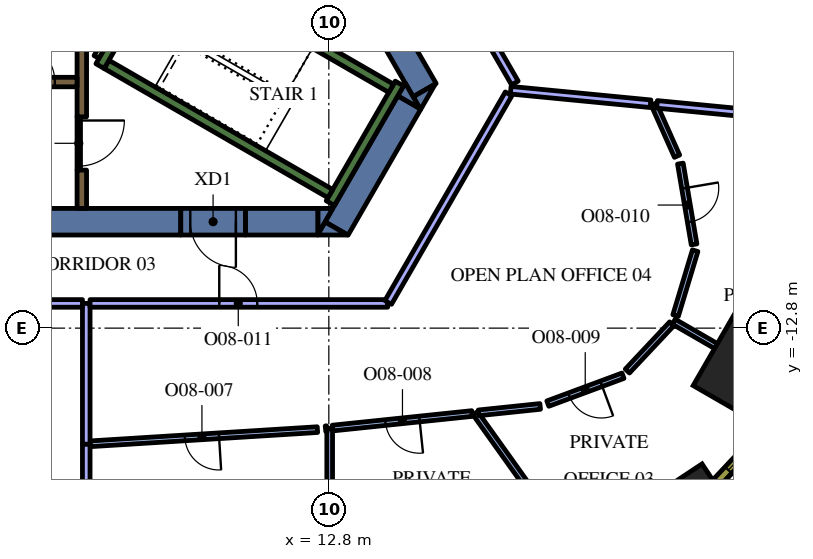
"""IFC4 building model, lengths in metres.
Left out: names, types, materials, properties, quantities, classifications, styles, units other than length and angle.
Written with IfcOpenShell. Run it as: python <this file> out.ifc"""

import sys

from ifc_helpers import new_model, si_unit, direction, frame, frame_2d, origin, origin_2d, place, context, subcontext, project, spatial, polyline, rectangle, outline, extrude, element, fill, save


model = new_model("IFC4")
c1 = context("Model", 3, precision=1e-05, world=origin(), true_north=direction((0.0, 1.0)))
c2 = subcontext(c1, "Body", "Model", "MODEL_VIEW")
j1 = project(units=[si_unit("LENGTHUNIT", "METRE"), si_unit("PLANEANGLEUNIT", "RADIAN")], contexts=[c1])
p1 = place(None, origin())
s1 = spatial("IfcSite", under=j1, at=p1, CompositionType="ELEMENT")
p2 = place(p1, origin())
s2 = spatial("IfcBuilding", under=s1, at=p2, CompositionType="ELEMENT")
p3 = place(p2, frame((0.0, 0.0, 231.0)))
s3 = spatial("IfcBuildingStorey", under=s2, at=p3, CompositionType="ELEMENT", Elevation=231.0)
p4 = place(p3, frame((24.027, -13.872, 0.0), z_axis=(0.0, 0.0, 1.0), x_axis=(0.866025403784, -0.5, 0.0)))
e1 = element("IfcColumn", 1, at=p4, inside=s3, PredefinedType="COLUMN", context=c2, shape_type="SweptSolid", body=[
    extrude(rectangle(XDim=2.4, YDim=2.4, at=origin_2d()), origin(), (0.0, 0.0, 1.0), 4.2),
])
p5 = place(p3, frame((22.494, -16.997, 0.0), z_axis=(0.0, 0.0, 1.0), x_axis=(0.833238868178, 0.552913183563, 0.0)))
e2 = element("IfcColumn", 2, at=p5, inside=s3, PredefinedType="COLUMN", context=c2, shape_type="SweptSolid", body=[
    extrude(rectangle(XDim=0.9, YDim=0.9, at=origin_2d()), origin(), (0.0, 0.0, 1.0), 4.2),
])
p6 = place(p3, frame((9.085, 4.264, 0.0), z_axis=(0.0, 0.0, 1.0), x_axis=(0.499998082512, -0.866026510844, 0.0)))
e3 = element("IfcWall", 3, at=p6, inside=s3, PredefinedType="SOLIDWALL", context=c2, shape_type="SweptSolid", body=[
    extrude(rectangle(XDim=12.472, YDim=0.7, at=frame_2d((6.236, 0.0))), origin(), (0.0, 0.0, 1.0), 4.2),
])
p7 = place(p3, origin())
e4 = element("IfcWall", 4, at=p7, inside=s3, PredefinedType="SOLIDWALL", context=c2, shape_type="SweptSolid", body=[
    extrude(outline(polyline([(15.213, -7.05), (15.019, -6.714), (15.601, -6.378), (15.213, -7.05)])), origin(), (0.0, 0.0, 1.0), 4.2),
])
p8 = place(p3, frame((13.003, -10.179, 0.0), z_axis=(0.0, 0.0, 1.0), x_axis=(0.499972675833, 0.866041178825, 0.0)))
e5 = element("IfcWall", 5, at=p8, inside=s3, PredefinedType="SOLIDWALL", context=c2, shape_type="SweptSolid", body=[
    extrude(rectangle(XDim=3.829, YDim=0.7, at=frame_2d((1.915, 0.0))), origin(), (0.0, 0.0, 1.0), 4.2),
])
e6 = element("IfcWall", 6, at=p7, inside=s3, PredefinedType="SOLIDWALL", context=c2, shape_type="SweptSolid", body=[
    extrude(outline(polyline([(12.5, -10.35), (12.698, -10.005), (13.296, -10.35), (12.5, -10.35)])), origin(), (0.0, 0.0, 1.0), 4.2),
])
e7 = element("IfcWall", 7, at=p7, inside=s3, PredefinedType="SOLIDWALL", context=c2, shape_type="SweptSolid", body=[
    extrude(outline(polyline([(14.809, -6.35), (15.197, -7.022), (14.615, -6.686), (14.809, -6.35)])), origin(), (0.0, 0.0, 1.0), 4.2),
])
p9 = place(p3, frame((10.604, -10.0, 0.0), z_axis=(0.0, 0.0, 1.0), x_axis=(1.0, 0.0, 0.0)))
e8 = element("IfcWall", 8, at=p9, inside=s3, PredefinedType="SOLIDWALL", context=c2, shape_type="SweptSolid", body=[
    extrude(rectangle(XDim=1.909, YDim=0.7, at=frame_2d((0.955, 0.0))), origin(), (0.0, 0.0, 1.0), 4.2),
])
e9 = element("IfcWall", 9, at=p7, inside=s3, PredefinedType="SOLIDWALL", context=c2, shape_type="SweptSolid", body=[
    extrude(outline(polyline([(12.904, -9.65), (12.516, -10.322), (12.516, -9.65), (12.904, -9.65)])), origin(), (0.0, 0.0, 1.0), 4.2),
])
p10 = place(p3, frame((8.904, -10.0, 0.0), z_axis=(0.0, 0.0, 1.0), x_axis=(-1.0, 0.0, 0.0)))
e10 = element("IfcWall", 10, at=p10, inside=s3, PredefinedType="SOLIDWALL", context=c2, shape_type="SweptSolid", body=[
    extrude(rectangle(XDim=22.226, YDim=0.7, at=frame_2d((11.113, 0.0))), origin(), (0.0, 0.0, 1.0), 4.2),
])
p11 = place(p3, frame((12.84, -9.511, 0.0), z_axis=(0.0, 0.0, 1.0), x_axis=(0.500048121057, 0.865997619297, 0.0)))
e11 = element("IfcWall", 11, at=p11, inside=s3, PredefinedType="SOLIDWALL", context=c2, shape_type="SweptSolid", body=[
    extrude(rectangle(XDim=3.634, YDim=0.25, at=frame_2d((1.817, 0.0))), origin(), (0.0, 0.0, 1.0), 4.2),
])
p12 = place(p3, frame((12.84, -9.261, 0.0), z_axis=(0.0, 0.0, 1.0), x_axis=(-0.866013990052, 0.500019768644, 0.0)))
e12 = element("IfcWall", 12, at=p12, inside=s3, PredefinedType="SOLIDWALL", context=c2, shape_type="SweptSolid", body=[
    extrude(rectangle(XDim=6.8, YDim=0.25, at=frame_2d((3.4, 0.0))), origin(), (0.0, 0.0, 1.0), 4.2),
])
p13 = place(p3, frame((6.78, -5.906, 0.0), z_axis=(0.0, 0.0, 1.0), x_axis=(0.500223362819, 0.865896406789, 0.0)))
e13 = element("IfcWall", 13, at=p13, inside=s3, PredefinedType="SOLIDWALL", context=c2, shape_type="SweptSolid", body=[
    extrude(rectangle(XDim=0.675, YDim=0.25, at=frame_2d((0.337, 0.0))), origin(), (0.0, 0.0, 1.0), 4.2),
])
p14 = place(p3, frame((8.334, -2.964, 0.0), z_axis=(0.0, 0.0, 1.0), x_axis=(0.866016039709, -0.500016218704, 0.0)))
e14 = element("IfcWall", 14, at=p14, inside=s3, PredefinedType="SOLIDWALL", context=c2, shape_type="SweptSolid", body=[
    extrude(rectangle(XDim=7.05, YDim=0.25, at=frame_2d((3.525, 0.0))), origin(), (0.0, 0.0, 1.0), 4.2),
])
p15 = place(p3, frame((6.3, -7.24, 0.0), z_axis=(0.0, 0.0, 1.0), x_axis=(0.0, 1.0, 0.0)))
e15 = element("IfcWall", 15, at=p15, inside=s3, PredefinedType="SOLIDWALL", context=c2, shape_type="SweptSolid", body=[
    extrude(rectangle(XDim=3.24, YDim=0.25, at=frame_2d((1.62, 0.0))), origin(), (0.0, 0.0, 1.0), 4.2),
])
p16 = place(p3, frame((6.3, -9.65, 0.0), z_axis=(0.0, 0.0, 1.0), x_axis=(0.0, 1.0, 0.0)))
e16 = element("IfcWall", 16, at=p16, inside=s3, PredefinedType="SOLIDWALL", context=c2, shape_type="SweptSolid", body=[
    extrude(rectangle(XDim=1.008, YDim=0.25, at=frame_2d((0.504, 0.0))), origin(), (0.0, 0.0, 1.0), 4.2),
])
p17 = place(p3, frame((6.945, -5.222, 0.0), z_axis=(0.0, 0.0, 1.0), x_axis=(-0.499818422106, -0.866130212453, 0.0)))
e17 = element("IfcWall", 17, at=p17, inside=s3, PredefinedType="PARTITIONING", context=c2, shape_type="SweptSolid", body=[
    extrude(rectangle(XDim=0.514, YDim=0.15, at=frame_2d((0.257, 0.0))), origin(), (0.0, 0.0, 1.0), 3.45),
])
p18 = place(p3, frame((-6.175, -6.325, 0.0), z_axis=(0.0, 0.0, 1.0), x_axis=(1.0, 0.0, 0.0)))
e18 = element("IfcWall", 18, at=p18, inside=s3, PredefinedType="SOLIDWALL", context=c2, shape_type="SweptSolid", body=[
    extrude(rectangle(XDim=12.35, YDim=0.25, at=frame_2d((6.175, 0.0))), origin(), (0.0, 0.0, 1.0), 4.2),
])
p19 = place(p18, frame((0.585, 0.0, 0.0)))
e19 = element("IfcOpeningElement", 19, at=p19, cuts=e18, PredefinedType="OPENING", context=c2, shape_type="SweptSolid", body=[
    extrude(rectangle(XDim=1.1, YDim=2.1, at=frame_2d((0.55, 1.05))), frame((0.0, 0.135, 0.0), z_axis=(0.0, -1.0, 0.0), x_axis=(1.0, 0.0, 0.0)), (0.0, 0.0, 1.0), 0.27),
])
p20 = place(p18, frame((3.105, 0.0, 0.0)))
e20 = element("IfcOpeningElement", 20, at=p20, cuts=e18, PredefinedType="OPENING", context=c2, shape_type="SweptSolid", body=[
    extrude(rectangle(XDim=1.1, YDim=2.1, at=frame_2d((0.55, 1.05))), frame((0.0, 0.135, 0.0), z_axis=(0.0, -1.0, 0.0), x_axis=(1.0, 0.0, 0.0)), (0.0, 0.0, 1.0), 0.27),
])
p21 = place(p18, frame((5.625, 0.0, 0.0)))
e21 = element("IfcOpeningElement", 21, at=p21, cuts=e18, PredefinedType="OPENING", context=c2, shape_type="SweptSolid", body=[
    extrude(rectangle(XDim=1.1, YDim=2.1, at=frame_2d((0.55, 1.05))), frame((0.0, 0.135, 0.0), z_axis=(0.0, -1.0, 0.0), x_axis=(1.0, 0.0, 0.0)), (0.0, 0.0, 1.0), 0.27),
])
p22 = place(p18, frame((8.145, 0.0, 0.0)))
e22 = element("IfcOpeningElement", 22, at=p22, cuts=e18, PredefinedType="OPENING", context=c2, shape_type="SweptSolid", body=[
    extrude(rectangle(XDim=1.1, YDim=2.1, at=frame_2d((0.55, 1.05))), frame((0.0, 0.135, 0.0), z_axis=(0.0, -1.0, 0.0), x_axis=(1.0, 0.0, 0.0)), (0.0, 0.0, 1.0), 0.27),
])
p23 = place(p18, frame((10.665, 0.0, 0.0)))
e23 = element("IfcOpeningElement", 23, at=p23, cuts=e18, PredefinedType="OPENING", context=c2, shape_type="SweptSolid", body=[
    extrude(rectangle(XDim=1.1, YDim=2.1, at=frame_2d((0.55, 1.05))), frame((0.0, 0.135, 0.0), z_axis=(0.0, -1.0, 0.0), x_axis=(1.0, 0.0, 0.0)), (0.0, 0.0, 1.0), 0.27),
])
p24 = place(p3, frame((6.22, -7.237, 0.0), z_axis=(0.0, 0.0, 1.0), x_axis=(0.0, -1.0, 0.0)))
e24 = element("IfcWall", 24, at=p24, inside=s3, PredefinedType="PARTITIONING", context=c2, shape_type="SweptSolid", body=[
    extrude(rectangle(XDim=1.4, YDim=0.09, at=frame_2d((0.7, 0.0))), origin(), (0.0, 0.0, 1.0), 3.45),
])
p25 = place(p24, frame((0.1, 0.0, 0.0)))
e25 = element("IfcOpeningElement", 25, at=p25, cuts=e24, PredefinedType="OPENING", context=c2, shape_type="SweptSolid", body=[
    extrude(rectangle(XDim=1.2, YDim=2.1, at=frame_2d((0.6, 1.05))), frame((0.0, 0.055, 0.0), z_axis=(0.0, -1.0, 0.0), x_axis=(1.0, 0.0, 0.0)), (0.0, 0.0, 1.0), 0.11),
])
p26 = place(p3, frame((10.604, -10.0, 0.0), z_axis=(0.0, 0.0, 1.0), x_axis=(-1.0, 0.0, 0.0)))
e26 = element("IfcWall", 26, at=p26, inside=s3, PredefinedType="SOLIDWALL", context=c2, shape_type="SweptSolid", body=[
    extrude(rectangle(XDim=1.7, YDim=0.7, at=frame_2d((0.85, 0.0))), origin(), (0.0, 0.0, 1.0), 4.2),
])
p27 = place(p26, frame((0.25, 0.0, 0.0)))
e27 = element("IfcOpeningElement", 27, at=p27, cuts=e26, PredefinedType="OPENING", context=c2, shape_type="SweptSolid", body=[
    extrude(rectangle(XDim=1.2, YDim=2.1, at=frame_2d((0.6, 1.05))), frame((0.0, 0.36, 0.0), z_axis=(0.0, -1.0, 0.0), x_axis=(1.0, 0.0, 0.0)), (0.0, 0.0, 1.0), 0.72),
])
p28 = place(p3, frame((6.417, -15.846, 0.0), z_axis=(0.0, 0.0, 1.0), x_axis=(0.0, -1.0, 0.0)))
e28 = element("IfcWall", 28, at=p28, inside=s3, PredefinedType="PARTITIONING", context=c2, shape_type="SweptSolid", body=[
    extrude(rectangle(XDim=3.051, YDim=0.2, at=frame_2d((1.525, 0.0))), origin(), (0.0, 0.0, 1.0), 3.45),
])
p29 = place(p3, frame((6.417, -12.15, 0.0), z_axis=(0.0, 0.0, 1.0), x_axis=(0.0, -1.0, 0.0)))
e29 = element("IfcWall", 29, at=p29, inside=s3, PredefinedType="PARTITIONING", context=c2, shape_type="SweptSolid", body=[
    extrude(rectangle(XDim=3.704, YDim=0.2, at=frame_2d((1.852, 0.0))), origin(), (0.0, 0.0, 1.0), 3.45),
])
p30 = place(p3, frame((4.53, -12.15, 0.0), z_axis=(0.0, 0.0, 1.0), x_axis=(1.0, 0.0, 0.0)))
e30 = element("IfcWall", 30, at=p30, inside=s3, PredefinedType="PARTITIONING", context=c2, shape_type="SweptSolid", body=[
    extrude(rectangle(XDim=1.787, YDim=0.2, at=frame_2d((0.894, 0.0))), origin(), (0.0, 0.0, 1.0), 3.45),
])
p31 = place(p3, frame((12.823, -15.437, 0.0), z_axis=(0.0, 0.0, 1.0), x_axis=(0.0, -1.0, 0.0)))
e31 = element("IfcWall", 31, at=p31, inside=s3, PredefinedType="PARTITIONING", context=c2, shape_type="SweptSolid", body=[
    extrude(rectangle(XDim=3.058, YDim=0.15, at=frame_2d((1.529, 0.0))), origin(), (0.0, 0.0, 1.0), 3.45),
])
p32 = place(p3, frame((12.5, -15.471, 0.0), z_axis=(0.0, 0.0, 1.0), x_axis=(-0.998061916726, -0.0622286942, 0.0)))
e32 = element("IfcWall", 32, at=p32, inside=s3, PredefinedType="PARTITIONING", context=c2, shape_type="SweptSolid", body=[
    extrude(rectangle(XDim=5.995, YDim=0.15, at=frame_2d((2.998, 0.0))), origin(), (0.0, 0.0, 1.0), 3.45),
])
p33 = place(p32, frame((2.595, 0.0, 0.0)))
e33 = element("IfcOpeningElement", 33, at=p33, cuts=e32, PredefinedType="OPENING", context=c2, shape_type="SweptSolid", body=[
    extrude(rectangle(XDim=0.9, YDim=2.1, at=frame_2d((0.45, 1.05))), frame((0.0, 0.085, 0.0), z_axis=(0.0, -1.0, 0.0), x_axis=(1.0, 0.0, 0.0)), (0.0, 0.0, 1.0), 0.17),
])
p34 = place(p3, frame((12.713, -15.448, 0.0), z_axis=(0.0, 0.0, 1.0), x_axis=(0.995106821048, 0.098804932586, 0.0)))
e34 = element("IfcWall", 34, at=p34, inside=s3, PredefinedType="PARTITIONING", context=c2, shape_type="SweptSolid", body=[
    extrude(rectangle(XDim=0.035, YDim=0.15, at=frame_2d((0.017, 0.0))), origin(), (0.0, 0.0, 1.0), 3.45),
])
p35 = place(p3, frame((16.655, -15.038, 0.0), z_axis=(0.0, 0.0, 1.0), x_axis=(0.580996489012, -0.813906063226, 0.0)))
e35 = element("IfcWall", 35, at=p35, inside=s3, PredefinedType="PARTITIONING", context=c2, shape_type="SweptSolid", body=[
    extrude(rectangle(XDim=3.536, YDim=0.15, at=frame_2d((1.768, 0.0))), origin(), (0.0, 0.0, 1.0), 3.45),
])
p36 = place(p3, frame((16.569, -15.047, 0.0), z_axis=(0.0, 0.0, 1.0), x_axis=(-0.994621532294, -0.103576095197, 0.0)))
e36 = element("IfcWall", 36, at=p36, inside=s3, PredefinedType="PARTITIONING", context=c2, shape_type="SweptSolid", body=[
    extrude(rectangle(XDim=3.691, YDim=0.15, at=frame_2d((1.846, 0.0))), origin(), (0.0, 0.0, 1.0), 3.45),
])
p37 = place(p36, frame((1.391, 0.0, 0.0)))
e37 = element("IfcOpeningElement", 37, at=p37, cuts=e36, PredefinedType="OPENING", context=c2, shape_type="SweptSolid", body=[
    extrude(rectangle(XDim=0.9, YDim=2.1, at=frame_2d((0.45, 1.05))), frame((0.0, 0.085, 0.0), z_axis=(0.0, -1.0, 0.0), x_axis=(1.0, 0.0, 0.0)), (0.0, 0.0, 1.0), 0.17),
])
p38 = place(p3, frame((21.877, -12.63, 0.0), z_axis=(0.0, 0.0, 1.0), x_axis=(0.86599869919, -0.500046250861, 0.0)))
e38 = element("IfcWall", 38, at=p38, inside=s3, PredefinedType="PARTITIONING", context=c2, shape_type="SweptSolid", body=[
    extrude(rectangle(XDim=1.284, YDim=0.15, at=frame_2d((0.642, 0.0))), origin(), (0.0, 0.0, 1.0), 3.45),
])
p39 = place(p3, frame((16.74, -15.029, 0.0), z_axis=(0.0, 0.0, 1.0), x_axis=(0.994614871477, 0.103640037805, 0.0)))
e39 = element("IfcWall", 39, at=p39, inside=s3, PredefinedType="PARTITIONING", context=c2, shape_type="SweptSolid", body=[
    extrude(rectangle(XDim=1.63, YDim=0.15, at=frame_2d((0.815, 0.0))), origin(), (0.0, 0.0, 1.0), 3.45),
])
p40 = place(p3, frame((20.541, -14.052, 0.0), z_axis=(0.0, 0.0, 1.0), x_axis=(-0.937602119917, -0.347710029662, 0.0)))
e40 = element("IfcWall", 40, at=p40, inside=s3, PredefinedType="PARTITIONING", context=c2, shape_type="SweptSolid", body=[
    extrude(rectangle(XDim=2.11, YDim=0.15, at=frame_2d((1.055, 0.0))), origin(), (0.0, 0.0, 1.0), 3.45),
])
p41 = place(p40, frame((0.61, 0.0, 0.0)))
e41 = element("IfcOpeningElement", 41, at=p41, cuts=e40, PredefinedType="OPENING", context=c2, shape_type="SweptSolid", body=[
    extrude(rectangle(XDim=0.9, YDim=2.1, at=frame_2d((0.45, 1.05))), frame((0.0, 0.085, 0.0), z_axis=(0.0, -1.0, 0.0), x_axis=(1.0, 0.0, 0.0)), (0.0, 0.0, 1.0), 0.17),
])
p42 = place(p3, frame((20.656, -13.929, 0.0), z_axis=(0.0, 0.0, 1.0), x_axis=(0.684716940988, 0.728809104447, 0.0)))
e42 = element("IfcWall", 42, at=p42, inside=s3, PredefinedType="PARTITIONING", context=c2, shape_type="SweptSolid", body=[
    extrude(rectangle(XDim=1.705, YDim=0.15, at=frame_2d((0.853, 0.0))), origin(), (0.0, 0.0, 1.0), 3.45),
])
p43 = place(p3, frame((21.925, -12.469, 0.0), z_axis=(0.0, 0.0, 1.0), x_axis=(0.288767705809, 0.957399191603, 0.0)))
e43 = element("IfcWall", 43, at=p43, inside=s3, PredefinedType="PARTITIONING", context=c2, shape_type="SweptSolid", body=[
    extrude(rectangle(XDim=1.782, YDim=0.15, at=frame_2d((0.891, 0.0))), origin(), (0.0, 0.0, 1.0), 3.45),
])
p44 = place(p3, frame((22.05, -8.471, 0.0), z_axis=(0.0, 0.0, 1.0), x_axis=(0.167612004459, -0.985853039738, 0.0)))
e44 = element("IfcWall", 44, at=p44, inside=s3, PredefinedType="PARTITIONING", context=c2, shape_type="SweptSolid", body=[
    extrude(rectangle(XDim=2.156, YDim=0.15, at=frame_2d((1.078, 0.0))), origin(), (0.0, 0.0, 1.0), 3.45),
])
p45 = place(p44, frame((0.656, 0.0, 0.0)))
e45 = element("IfcOpeningElement", 45, at=p45, cuts=e44, PredefinedType="OPENING", context=c2, shape_type="SweptSolid", body=[
    extrude(rectangle(XDim=0.9, YDim=2.1, at=frame_2d((0.45, 1.05))), frame((0.0, 0.085, 0.0), z_axis=(0.0, -1.0, 0.0), x_axis=(1.0, 0.0, 0.0)), (0.0, 0.0, 1.0), 0.17),
])
p46 = place(p3, frame((21.963, -8.276, 0.0), z_axis=(0.0, 0.0, 1.0), x_axis=(-0.407510458183, 0.913200540118, 0.0)))
e46 = element("IfcWall", 46, at=p46, inside=s3, PredefinedType="PARTITIONING", context=c2, shape_type="SweptSolid", body=[
    extrude(rectangle(XDim=1.502, YDim=0.15, at=frame_2d((0.751, 0.0))), origin(), (0.0, 0.0, 1.0), 3.45),
])
p47 = place(p3, frame((21.437, -6.913, 0.0), z_axis=(0.0, 0.0, 1.0), x_axis=(0.995357015301, -0.096251816042, 0.0)))
e47 = element("IfcWall", 47, at=p47, inside=s3, PredefinedType="PARTITIONING", context=c2, shape_type="SweptSolid", body=[
    extrude(rectangle(XDim=3.45, YDim=0.2, at=frame_2d((1.725, 0.0))), origin(), (0.0, 0.0, 1.0), 3.45),
])
p48 = place(p3, frame((17.586, -6.54, 0.0), z_axis=(0.0, 0.0, 1.0), x_axis=(0.995358181524, -0.096239755158, 0.0)))
e48 = element("IfcWall", 48, at=p48, inside=s3, PredefinedType="PARTITIONING", context=c2, shape_type="SweptSolid", body=[
    extrude(rectangle(XDim=3.696, YDim=0.2, at=frame_2d((1.848, 0.0))), origin(), (0.0, 0.0, 1.0), 3.45),
])
p49 = place(p3, frame((6.517, -12.15, 0.0), z_axis=(0.0, 0.0, 1.0), x_axis=(1.0, 0.0, 0.0)))
e49 = element("IfcWall", 49, at=p49, inside=s3, PredefinedType="PARTITIONING", context=c2, shape_type="SweptSolid", body=[
    extrude(rectangle(XDim=7.83, YDim=0.2, at=frame_2d((3.915, 0.0))), origin(), (0.0, 0.0, 1.0), 3.45),
])
p50 = place(p49, frame((3.4, 0.0, 0.0)))
e50 = element("IfcOpeningElement", 50, at=p50, cuts=e49, PredefinedType="OPENING", context=c2, shape_type="SweptSolid", body=[
    extrude(rectangle(XDim=1.0, YDim=2.1, at=frame_2d((0.5, 1.05))), frame((0.0, 0.11, 0.0), z_axis=(0.0, -1.0, 0.0), x_axis=(1.0, 0.0, 0.0)), (0.0, 0.0, 1.0), 0.22),
])
p51 = place(p3, frame((14.362, -12.124, 0.0), z_axis=(0.0, 0.0, 1.0), x_axis=(0.500017005442, 0.866015585465, 0.0)))
e51 = element("IfcWall", 51, at=p51, inside=s3, PredefinedType="PARTITIONING", context=c2, shape_type="SweptSolid", body=[
    extrude(rectangle(XDim=6.338, YDim=0.2, at=frame_2d((3.169, 0.0))), origin(), (0.0, 0.0, 1.0), 3.45),
])
p52 = place(p3, frame((17.696, -6.35, 0.0), z_axis=(0.0, 0.0, 1.0), x_axis=(-0.499976825411, 0.866038783226, 0.0)))
e52 = element("IfcWall", 52, at=p52, inside=s3, PredefinedType="PARTITIONING", context=c2, shape_type="SweptSolid", body=[
    extrude(rectangle(XDim=4.653, YDim=0.2, at=frame_2d((2.326, 0.0))), origin(), (0.0, 0.0, 1.0), 3.45),
])
p53 = place(p3, frame((22.989, -16.879, 0.0), z_axis=(0.0, 0.0, 1.0), x_axis=(0.684770274166, 0.728758994194, 0.0)))
e53 = element("IfcWall", 53, at=p53, inside=s3, PredefinedType="SOLIDWALL", context=c2, shape_type="SweptSolid", body=[
    extrude(rectangle(XDim=1.948, YDim=0.24, at=frame_2d((0.974, 0.0))), origin(), (0.0, 0.0, 1.0), 3.95),
])
p54 = place(p53, frame((0.474, 0.0, 0.9)))
e54 = element("IfcOpeningElement", 54, at=p54, cuts=e53, PredefinedType="OPENING", context=c2, shape_type="SweptSolid", body=[
    extrude(rectangle(XDim=1.0, YDim=2.55, at=frame_2d((0.5, 1.275))), frame((0.0, 0.13, 0.0), z_axis=(0.0, -1.0, 0.0), x_axis=(1.0, 0.0, 0.0)), (0.0, 0.0, 1.0), 0.26),
])
p55 = place(p3, frame((25.405, -6.861, 0.0), z_axis=(0.0, 0.0, 1.0), x_axis=(-0.407579651789, 0.913169659728, 0.0)))
e55 = element("IfcWall", 55, at=p55, inside=s3, PredefinedType="SOLIDWALL", context=c2, shape_type="SweptSolid", body=[
    extrude(rectangle(XDim=5.311, YDim=0.24, at=frame_2d((2.655, 0.0))), origin(), (0.0, 0.0, 1.0), 3.95),
])
p56 = place(p55, frame((0.271, 0.0, 0.9)))
e56 = element("IfcOpeningElement", 56, at=p56, cuts=e55, PredefinedType="OPENING", context=c2, shape_type="SweptSolid", body=[
    extrude(rectangle(XDim=1.5, YDim=2.55, at=frame_2d((0.75, 1.275))), frame((0.0, 0.13, 0.0), z_axis=(0.0, -1.0, 0.0), x_axis=(1.0, 0.0, 0.0)), (0.0, 0.0, 1.0), 0.26),
])
p57 = place(p55, frame((3.504, 0.0, 0.9)))
e57 = element("IfcOpeningElement", 57, at=p57, cuts=e55, PredefinedType="OPENING", context=c2, shape_type="SweptSolid", body=[
    extrude(rectangle(XDim=1.5, YDim=2.55, at=frame_2d((0.75, 1.275))), frame((0.0, 0.13, 0.0), z_axis=(0.0, -1.0, 0.0), x_axis=(1.0, 0.0, 0.0)), (0.0, 0.0, 1.0), 0.26),
])
p58 = place(p23, origin())
e58 = element("IfcDoor", 58, at=p58, inside=s3, OperationType="DOUBLE_DOOR_SLIDING", PredefinedType="DOOR", context=c2, shape_type="SweptSolid", body=[
    extrude(rectangle(XDim=1.1, YDim=2.1, at=frame_2d((0.55, 1.05))), frame((0.0, 0.025, 0.0), z_axis=(0.0, -1.0, 0.0), x_axis=(1.0, 0.0, 0.0)), (0.0, 0.0, 1.0), 0.05),
])
fill(e23, e58)
p59 = place(p25, origin())
e59 = element("IfcDoor", 59, at=p59, inside=s3, OperationType="SINGLE_SWING_LEFT", PredefinedType="DOOR", context=c2, shape_type="SweptSolid", body=[
    extrude(rectangle(XDim=1.2, YDim=2.1, at=frame_2d((0.6, 1.05))), frame((0.0, 0.025, 0.0), z_axis=(0.0, -1.0, 0.0), x_axis=(1.0, 0.0, 0.0)), (0.0, 0.0, 1.0), 0.05),
])
fill(e25, e59)
p60 = place(p27, origin())
e60 = element("IfcDoor", 60, at=p60, inside=s3, OperationType="SINGLE_SWING_LEFT", PredefinedType="DOOR", context=c2, shape_type="SweptSolid", body=[
    extrude(rectangle(XDim=1.2, YDim=2.1, at=frame_2d((0.6, 1.05))), frame((0.0, 0.025, 0.0), z_axis=(0.0, -1.0, 0.0), x_axis=(1.0, 0.0, 0.0)), (0.0, 0.0, 1.0), 0.05),
])
fill(e27, e60)
p61 = place(p33, origin())
e61 = element("IfcDoor", 61, at=p61, inside=s3, OperationType="SINGLE_SWING_RIGHT", PredefinedType="DOOR", context=c2, shape_type="SweptSolid", body=[
    extrude(rectangle(XDim=0.9, YDim=2.1, at=frame_2d((0.45, 1.05))), frame((0.0, 0.025, 0.0), z_axis=(0.0, -1.0, 0.0), x_axis=(1.0, 0.0, 0.0)), (0.0, 0.0, 1.0), 0.05),
])
fill(e33, e61)
p62 = place(p37, origin())
e62 = element("IfcDoor", 62, at=p62, inside=s3, OperationType="SINGLE_SWING_LEFT", PredefinedType="DOOR", context=c2, shape_type="SweptSolid", body=[
    extrude(rectangle(XDim=0.9, YDim=2.1, at=frame_2d((0.45, 1.05))), frame((0.0, 0.025, 0.0), z_axis=(0.0, -1.0, 0.0), x_axis=(1.0, 0.0, 0.0)), (0.0, 0.0, 1.0), 0.05),
])
fill(e37, e62)
p63 = place(p41, origin())
e63 = element("IfcDoor", 63, at=p63, inside=s3, OperationType="SINGLE_SWING_RIGHT", PredefinedType="DOOR", context=c2, shape_type="SweptSolid", body=[
    extrude(rectangle(XDim=0.9, YDim=2.1, at=frame_2d((0.45, 1.05))), frame((0.0, 0.025, 0.0), z_axis=(0.0, -1.0, 0.0), x_axis=(1.0, 0.0, 0.0)), (0.0, 0.0, 1.0), 0.05),
])
fill(e41, e63)
p64 = place(p45, origin())
e64 = element("IfcDoor", 64, at=p64, inside=s3, OperationType="SINGLE_SWING_RIGHT", PredefinedType="DOOR", context=c2, shape_type="SweptSolid", body=[
    extrude(rectangle(XDim=0.9, YDim=2.1, at=frame_2d((0.45, 1.05))), frame((0.0, 0.025, 0.0), z_axis=(0.0, -1.0, 0.0), x_axis=(1.0, 0.0, 0.0)), (0.0, 0.0, 1.0), 0.05),
])
fill(e45, e64)
p65 = place(p50, origin())
e65 = element("IfcDoor", 65, at=p65, inside=s3, OperationType="SINGLE_SWING_LEFT", PredefinedType="DOOR", context=c2, shape_type="SweptSolid", body=[
    extrude(rectangle(XDim=1.0, YDim=2.1, at=frame_2d((0.5, 1.05))), frame((0.0, 0.025, 0.0), z_axis=(0.0, -1.0, 0.0), x_axis=(1.0, 0.0, 0.0)), (0.0, 0.0, 1.0), 0.05),
])
fill(e50, e65)
p66 = place(p54, origin())
e66 = element("IfcWindow", 66, at=p66, inside=s3, PartitioningType="SINGLE_PANEL", PredefinedType="WINDOW", context=c2, shape_type="SweptSolid", body=[
    extrude(rectangle(XDim=1.0, YDim=2.55, at=frame_2d((0.5, 1.275))), frame((0.0, 0.04, 0.0), z_axis=(0.0, -1.0, 0.0), x_axis=(1.0, 0.0, 0.0)), (0.0, 0.0, 1.0), 0.06),
])
fill(e54, e66)
save(model, sys.argv[1])
